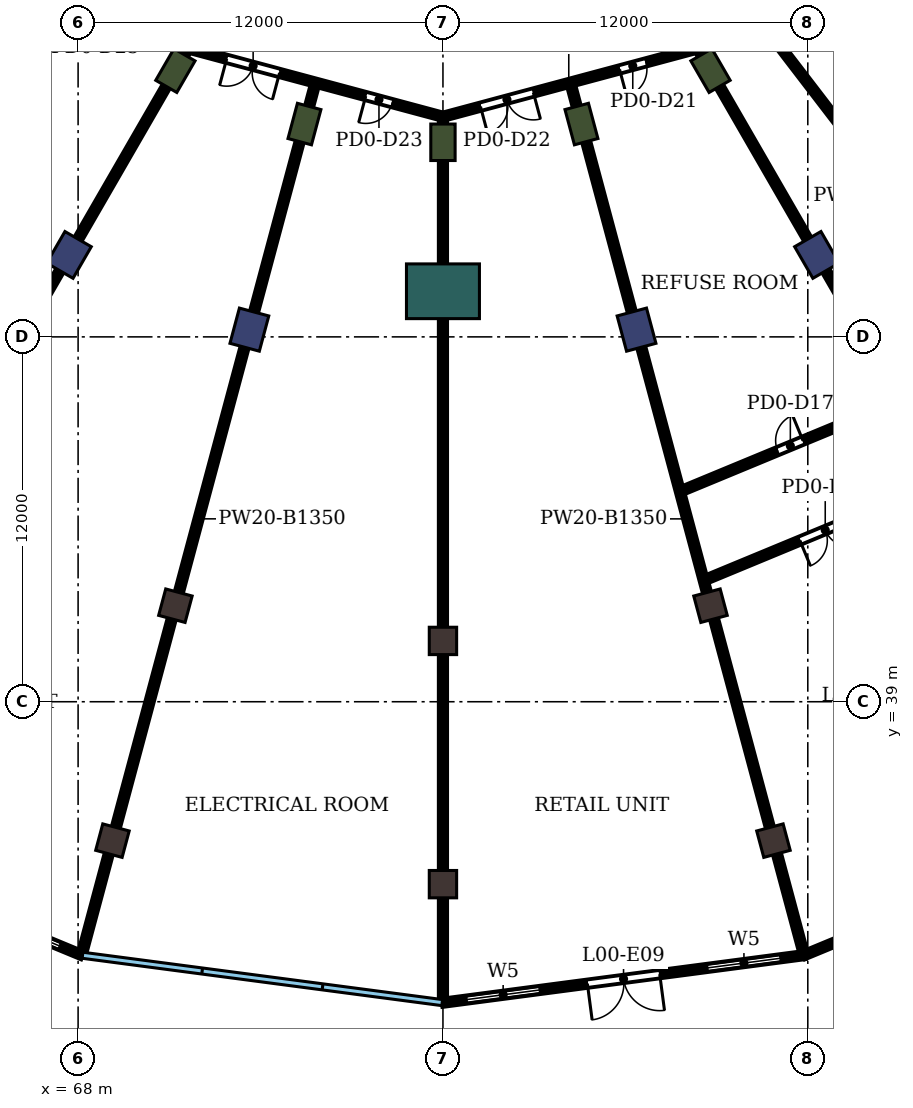
"""IFC4 building model, lengths in metres.
Left out: names, types, materials, properties, quantities, classifications, styles, units other than length and angle.
Written with IfcOpenShell. Run it as: python <this file> out.ifc"""

import sys

from ifc_helpers import new_model, si_unit, direction, frame, frame_2d, origin, origin_2d, place, context, subcontext, project, spatial, rectangle, extrude, element, fill, save


model = new_model("IFC4")
c1 = context("Model", 3, precision=1e-05, world=origin(), true_north=direction((0.0, 1.0)))
c2 = subcontext(c1, "Body", "Model", "MODEL_VIEW")
j1 = project(units=[si_unit("LENGTHUNIT", "METRE"), si_unit("PLANEANGLEUNIT", "RADIAN")], contexts=[c1])
p1 = place(None, origin())
s1 = spatial("IfcSite", under=j1, at=p1, CompositionType="ELEMENT")
p2 = place(p1, origin())
s2 = spatial("IfcBuilding", under=s1, at=p2, CompositionType="ELEMENT")
p3 = place(p2, origin())
s3 = spatial("IfcBuildingStorey", under=s2, at=p3, CompositionType="ELEMENT", Elevation=0.0)
for number, where, z_axis, x_axis in (
    (1, (69.13, 34.431, 0.0), (0.0, 0.0, 1.0), (-0.259, -0.966, 0.0)),
    (2, (80.0, 33.0, 0.0), (0.0, 0.0, 1.0), (0.0, -1.0, 0.0)),
    (3, (90.87, 34.431, 0.0), (0.0, 0.0, 1.0), (0.259, -0.966, 0.0)),
    (4, (71.2, 42.158, 0.0), (0.0, 0.0, 1.0), (-0.259, -0.966, 0.0)),
    (5, (80.0, 41.0, 0.0), (0.0, 0.0, 1.0), (0.0, -1.0, 0.0)),
    (6, (88.8, 42.158, 0.0), (0.0, 0.0, 1.0), (0.259, -0.966, 0.0)),
):
    element("IfcColumn", number, at=place(p3, frame(where, z_axis=z_axis, x_axis=x_axis)), inside=s3, PredefinedType="COLUMN", context=c2, shape_type="SweptSolid", body=[
        extrude(rectangle(XDim=0.9, YDim=0.9, at=origin_2d()), origin(), (0.0, 0.0, 1.0), 7.0),
    ])
for number, where, z_axis, x_axis in (
    (7, (67.7, 53.696, 0.0), (0.0, 0.0, 1.0), (-0.5, -0.866, 0.0)),
    (8, (73.633, 51.238, 0.0), (0.0, 0.0, 1.0), (-0.259, -0.966, 0.0)),
    (9, (86.367, 51.238, 0.0), (0.0, 0.0, 1.0), (0.259, -0.966, 0.0)),
    (10, (92.3, 53.696, 0.0), (0.0, 0.0, 1.0), (0.5, -0.866, 0.0)),
):
    element("IfcColumn", number, at=place(p3, frame(where, z_axis=z_axis, x_axis=x_axis)), inside=s3, PredefinedType="COLUMN", context=c2, shape_type="SweptSolid", body=[
        extrude(rectangle(XDim=1.2, YDim=1.0, at=origin_2d()), origin(), (0.0, 0.0, 1.0), 7.0),
    ])
for number, where, z_axis, x_axis in (
    (11, (71.2, 59.758, 0.0), (0.0, 0.0, 1.0), (-0.5, -0.866, 0.0)),
    (12, (75.445, 58.0, 0.0), (0.0, 0.0, 1.0), (-0.259, -0.966, 0.0)),
    (13, (80.0, 57.4, 0.0), (0.0, 0.0, 1.0), (0.0, -1.0, 0.0)),
    (14, (84.555, 58.0, 0.0), (0.0, 0.0, 1.0), (0.259, -0.966, 0.0)),
    (15, (88.8, 59.758, 0.0), (0.0, 0.0, 1.0), (0.5, -0.866, 0.0)),
):
    element("IfcColumn", number, at=place(p3, frame(where, z_axis=z_axis, x_axis=x_axis)), inside=s3, PredefinedType="COLUMN", context=c2, shape_type="SweptSolid", body=[
        extrude(rectangle(XDim=1.2, YDim=0.8, at=origin_2d()), origin(), (0.0, 0.0, 1.0), 7.0),
    ])
p4 = place(p3, frame((80.0, 52.5, 0.0), z_axis=(0.0, 0.0, 1.0), x_axis=(0.0, -1.0, 0.0)))
e16 = element("IfcColumn", 16, at=p4, inside=s3, PredefinedType="COLUMN", context=c2, shape_type="SweptSolid", body=[
    extrude(rectangle(XDim=1.8, YDim=2.4, at=origin_2d()), origin(), (0.0, 0.0, 1.0), 7.0),
])
p5 = place(p3, frame((57.051, 35.25, 0.0), z_axis=(0.0, 0.0, 1.0), x_axis=(0.923874283273, -0.382696104901, 0.0)))
e17 = element("IfcWall", 17, at=p5, inside=s3, PredefinedType="NOTDEFINED", context=c2, shape_type="SweptSolid", body=[
    extrude(rectangle(XDim=11.982, YDim=0.2, at=frame_2d((5.991, 0.0))), origin(), (0.0, 0.0, 1.0), 7.0),
])
p6 = place(p5, frame((0.797, 0.0, 0.9)))
e18 = element("IfcOpeningElement", 18, at=p6, cuts=e17, PredefinedType="OPENING", context=c2, shape_type="SweptSolid", body=[
    extrude(rectangle(XDim=2.4, YDim=3.6, at=frame_2d((1.2, 1.8))), frame((0.0, 0.11, 0.0), z_axis=(0.0, -1.0, 0.0), x_axis=(1.0, 0.0, 0.0)), (0.0, 0.0, 1.0), 0.22),
])
p7 = place(p5, frame((4.791, 0.0, 0.0)))
e19 = element("IfcOpeningElement", 19, at=p7, cuts=e17, PredefinedType="OPENING", context=c2, shape_type="SweptSolid", body=[
    extrude(rectangle(XDim=2.4, YDim=2.7, at=frame_2d((1.2, 1.35))), frame((0.0, 0.11, 0.0), z_axis=(0.0, -1.0, 0.0), x_axis=(1.0, 0.0, 0.0)), (0.0, 0.0, 1.0), 0.22),
])
p8 = place(p5, frame((8.785, 0.0, 0.9)))
e20 = element("IfcOpeningElement", 20, at=p8, cuts=e17, PredefinedType="OPENING", context=c2, shape_type="SweptSolid", body=[
    extrude(rectangle(XDim=2.4, YDim=3.6, at=frame_2d((1.2, 1.8))), frame((0.0, 0.11, 0.0), z_axis=(0.0, -1.0, 0.0), x_axis=(1.0, 0.0, 0.0)), (0.0, 0.0, 1.0), 0.22),
])
p9 = place(p3, frame((80.0, 29.101, 0.0), z_axis=(0.0, 0.0, 1.0), x_axis=(0.991445069361, 0.130524612391, 0.0)))
e21 = element("IfcWall", 21, at=p9, inside=s3, PredefinedType="NOTDEFINED", context=c2, shape_type="SweptSolid", body=[
    extrude(rectangle(XDim=11.982, YDim=0.2, at=frame_2d((5.991, 0.0))), origin(), (0.0, 0.0, 1.0), 7.0),
])
p10 = place(p9, frame((0.797, 0.0, 0.9)))
e22 = element("IfcOpeningElement", 22, at=p10, cuts=e21, PredefinedType="OPENING", context=c2, shape_type="SweptSolid", body=[
    extrude(rectangle(XDim=2.4, YDim=3.6, at=frame_2d((1.2, 1.8))), frame((0.0, 0.11, 0.0), z_axis=(0.0, -1.0, 0.0), x_axis=(1.0, 0.0, 0.0)), (0.0, 0.0, 1.0), 0.22),
])
p11 = place(p9, frame((4.791, 0.0, 0.0)))
e23 = element("IfcOpeningElement", 23, at=p11, cuts=e21, PredefinedType="OPENING", context=c2, shape_type="SweptSolid", body=[
    extrude(rectangle(XDim=2.4, YDim=2.7, at=frame_2d((1.2, 1.35))), frame((0.0, 0.11, 0.0), z_axis=(0.0, -1.0, 0.0), x_axis=(1.0, 0.0, 0.0)), (0.0, 0.0, 1.0), 0.22),
])
p12 = place(p9, frame((8.785, 0.0, 0.9)))
e24 = element("IfcOpeningElement", 24, at=p12, cuts=e21, PredefinedType="OPENING", context=c2, shape_type="SweptSolid", body=[
    extrude(rectangle(XDim=2.4, YDim=3.6, at=frame_2d((1.2, 1.8))), frame((0.0, 0.11, 0.0), z_axis=(0.0, -1.0, 0.0), x_axis=(1.0, 0.0, 0.0)), (0.0, 0.0, 1.0), 0.22),
])
p13 = place(p3, frame((91.88, 30.665, 0.0), z_axis=(0.0, 0.0, 1.0), x_axis=(0.923874283273, 0.382696104901, 0.0)))
e25 = element("IfcWall", 25, at=p13, inside=s3, PredefinedType="NOTDEFINED", context=c2, shape_type="SweptSolid", body=[
    extrude(rectangle(XDim=11.982, YDim=0.2, at=frame_2d((5.991, 0.0))), origin(), (0.0, 0.0, 1.0), 7.0),
])
p14 = place(p13, frame((3.891, 0.0, 0.0)))
e26 = element("IfcOpeningElement", 26, at=p14, cuts=e25, PredefinedType="OPENING", context=c2, shape_type="SweptSolid", body=[
    extrude(rectangle(XDim=4.2, YDim=4.5, at=frame_2d((2.1, 2.25))), frame((0.0, 0.11, 0.0), z_axis=(0.0, -1.0, 0.0), x_axis=(1.0, 0.0, 0.0)), (0.0, 0.0, 1.0), 0.22),
])
p15 = place(p3, frame((47.615, 42.615, 0.0), z_axis=(0.0, 0.0, 1.0), x_axis=(0.707106781187, 0.707106781187, 0.0)))
e27 = element("IfcWall", 27, at=p15, inside=s3, PredefinedType="PARTITIONING", context=c2, shape_type="SweptSolid", body=[
    extrude(rectangle(XDim=29.203, YDim=0.2, at=frame_2d((14.602, 0.0))), origin(), (0.0, 0.0, 1.0), 5.65),
])
p16 = place(p3, frame((57.099, 35.339, 0.0), z_axis=(0.0, 0.0, 1.0), x_axis=(0.500039914135, 0.866002358122, 0.0)))
e28 = element("IfcWall", 28, at=p16, inside=s3, PredefinedType="PARTITIONING", context=c2, shape_type="SweptSolid", body=[
    extrude(rectangle(XDim=28.958, YDim=0.2, at=frame_2d((14.479, 0.0))), origin(), (0.0, 0.0, 1.0), 5.65),
])
p17 = place(p3, frame((68.142, 30.764, 0.0), z_axis=(0.0, 0.0, 1.0), x_axis=(0.258909634149, 0.965901548474, 0.0)))
e29 = element("IfcWall", 29, at=p17, inside=s3, PredefinedType="PARTITIONING", context=c2, shape_type="SweptSolid", body=[
    extrude(rectangle(XDim=29.509, YDim=0.2, at=frame_2d((14.754, 0.0))), origin(), (0.0, 0.0, 1.0), 5.65),
])
p18 = place(p3, frame((71.685, 60.468, 0.0), z_axis=(0.0, 0.0, 1.0), x_axis=(0.96590736437, -0.258887936097, 0.0)))
e30 = element("IfcWall", 30, at=p18, inside=s3, PredefinedType="PARTITIONING", context=c2, shape_type="SweptSolid", body=[
    extrude(rectangle(XDim=8.519, YDim=0.2, at=frame_2d((4.259, 0.0))), origin(), (0.0, 0.0, 1.0), 6.55),
])
p19 = place(p18, frame((5.979, 0.0, 0.0)))
e31 = element("IfcOpeningElement", 31, at=p19, cuts=e30, PredefinedType="OPENING", context=c2, shape_type="SweptSolid", body=[
    extrude(rectangle(XDim=0.9, YDim=2.1, at=frame_2d((0.45, 1.05))), frame((0.0, 0.11, 0.0), z_axis=(0.0, -1.0, 0.0), x_axis=(1.0, 0.0, 0.0)), (0.0, 0.0, 1.0), 0.22),
])
p20 = place(p18, frame((1.245, 0.0, 0.0)))
e32 = element("IfcOpeningElement", 32, at=p20, cuts=e30, PredefinedType="OPENING", context=c2, shape_type="SweptSolid", body=[
    extrude(rectangle(XDim=1.8, YDim=2.1, at=frame_2d((0.9, 1.05))), frame((0.0, 0.11, 0.0), z_axis=(0.0, -1.0, 0.0), x_axis=(1.0, 0.0, 0.0)), (0.0, 0.0, 1.0), 0.22),
])
p21 = place(p3, frame((80.0, 29.202, 0.0), z_axis=(0.0, 0.0, 1.0), x_axis=(0.0, 1.0, 0.0)))
e33 = element("IfcWall", 33, at=p21, inside=s3, PredefinedType="PARTITIONING", context=c2, shape_type="SweptSolid", body=[
    extrude(rectangle(XDim=28.948, YDim=0.2, at=frame_2d((14.474, 0.0))), origin(), (0.0, 0.0, 1.0), 5.65),
])
p22 = place(p3, frame((80.0, 58.24, 0.0), z_axis=(0.0, 0.0, 1.0), x_axis=(0.965929228495, 0.258806347564, 0.0)))
e34 = element("IfcWall", 34, at=p22, inside=s3, PredefinedType="PARTITIONING", context=c2, shape_type="SweptSolid", body=[
    extrude(rectangle(XDim=8.568, YDim=0.2, at=frame_2d((4.284, 0.0))), origin(), (0.0, 0.0, 1.0), 6.55),
])
p23 = place(p22, frame((6.013, 0.0, 0.0)))
e35 = element("IfcOpeningElement", 35, at=p23, cuts=e34, PredefinedType="OPENING", context=c2, shape_type="SweptSolid", body=[
    extrude(rectangle(XDim=0.9, YDim=2.1, at=frame_2d((0.45, 1.05))), frame((0.0, 0.11, 0.0), z_axis=(0.0, -1.0, 0.0), x_axis=(1.0, 0.0, 0.0)), (0.0, 0.0, 1.0), 0.22),
])
p24 = place(p22, frame((1.279, 0.0, 0.0)))
e36 = element("IfcOpeningElement", 36, at=p24, cuts=e34, PredefinedType="OPENING", context=c2, shape_type="SweptSolid", body=[
    extrude(rectangle(XDim=1.8, YDim=2.1, at=frame_2d((0.9, 1.05))), frame((0.0, 0.11, 0.0), z_axis=(0.0, -1.0, 0.0), x_axis=(1.0, 0.0, 0.0)), (0.0, 0.0, 1.0), 0.22),
])
p25 = place(p3, frame((84.216, 59.265, 0.0), z_axis=(0.0, 0.0, 1.0), x_axis=(0.258760898943, -0.96594140463, 0.0)))
e37 = element("IfcWall", 37, at=p25, inside=s3, PredefinedType="PARTITIONING", context=c2, shape_type="SweptSolid", body=[
    extrude(rectangle(XDim=29.508, YDim=0.2, at=frame_2d((14.754, 0.0))), origin(), (0.0, 0.0, 1.0), 5.65),
])
p26 = place(p3, frame((87.896, 45.954, 0.0), z_axis=(0.0, 0.0, 1.0), x_axis=(0.923937266852, 0.382544019587, 0.0)))
e38 = element("IfcWall", 38, at=p26, inside=s3, PredefinedType="PARTITIONING", context=c2, shape_type="SweptSolid", body=[
    extrude(rectangle(XDim=7.628, YDim=0.2, at=frame_2d((3.814, 0.0))), origin(), (0.0, 0.0, 1.0), 6.55),
])
p27 = place(p26, frame((3.371, 0.0, 0.0)))
e39 = element("IfcOpeningElement", 39, at=p27, cuts=e38, PredefinedType="OPENING", context=c2, shape_type="SweptSolid", body=[
    extrude(rectangle(XDim=0.9, YDim=2.1, at=frame_2d((0.45, 1.05))), frame((0.0, 0.11, 0.0), z_axis=(0.0, -1.0, 0.0), x_axis=(1.0, 0.0, 0.0)), (0.0, 0.0, 1.0), 0.22),
])
p28 = place(p3, frame((88.362, 60.509, 0.0), z_axis=(0.0, 0.0, 1.0), x_axis=(0.499842399886, -0.866116375134, 0.0)))
e40 = element("IfcWall", 40, at=p28, inside=s3, PredefinedType="PARTITIONING", context=c2, shape_type="SweptSolid", body=[
    extrude(rectangle(XDim=13.274, YDim=0.2, at=frame_2d((6.637, 0.0))), origin(), (0.0, 0.0, 1.0), 5.65),
])
p29 = place(p3, frame((88.679, 43.031, 0.0), z_axis=(0.0, 0.0, 1.0), x_axis=(0.923882727898, 0.382675717927, 0.0)))
e41 = element("IfcWall", 41, at=p29, inside=s3, PredefinedType="PARTITIONING", context=c2, shape_type="SweptSolid", body=[
    extrude(rectangle(XDim=8.432, YDim=0.2, at=frame_2d((4.216, 0.0))), origin(), (0.0, 0.0, 1.0), 6.55),
])
p30 = place(p29, frame((3.316, 0.0, 0.0)))
e42 = element("IfcOpeningElement", 42, at=p30, cuts=e41, PredefinedType="OPENING", context=c2, shape_type="SweptSolid", body=[
    extrude(rectangle(XDim=1.8, YDim=2.1, at=frame_2d((0.9, 1.05))), frame((0.0, 0.11, 0.0), z_axis=(0.0, -1.0, 0.0), x_axis=(1.0, 0.0, 0.0)), (0.0, 0.0, 1.0), 0.22),
])
p31 = place(p3, frame((90.088, 61.849, 0.0), z_axis=(0.0, 0.0, 1.0), x_axis=(0.608726617775, -0.793380050677, 0.0)))
e43 = element("IfcWall", 43, at=p31, inside=s3, PredefinedType="PARTITIONING", context=c2, shape_type="SweptSolid", body=[
    extrude(rectangle(XDim=13.182, YDim=0.2, at=frame_2d((6.591, 0.0))), origin(), (0.0, 0.0, 1.0), 6.55),
])
p32 = place(p3, frame((91.732, 63.263, 0.0), z_axis=(0.0, 0.0, 1.0), x_axis=(0.706939557171, -0.707273965665, 0.0)))
e44 = element("IfcWall", 44, at=p32, inside=s3, PredefinedType="PARTITIONING", context=c2, shape_type="SweptSolid", body=[
    extrude(rectangle(XDim=29.203, YDim=0.2, at=frame_2d((14.601, 0.0))), origin(), (0.0, 0.0, 1.0), 5.65),
])
p33 = place(p8, origin())
e45 = element("IfcWindow", 45, at=p33, inside=s3, PartitioningType="SINGLE_PANEL", PredefinedType="WINDOW", context=c2, shape_type="SweptSolid", body=[
    extrude(rectangle(XDim=2.4, YDim=3.6, at=frame_2d((1.2, 1.8))), frame((0.0, 0.03, 0.0), z_axis=(0.0, -1.0, 0.0), x_axis=(1.0, 0.0, 0.0)), (0.0, 0.0, 1.0), 0.06),
])
fill(e20, e45)
p34 = place(p10, origin())
e46 = element("IfcWindow", 46, at=p34, inside=s3, PartitioningType="SINGLE_PANEL", PredefinedType="WINDOW", context=c2, shape_type="SweptSolid", body=[
    extrude(rectangle(XDim=2.4, YDim=3.6, at=frame_2d((1.2, 1.8))), frame((0.0, 0.03, 0.0), z_axis=(0.0, -1.0, 0.0), x_axis=(1.0, 0.0, 0.0)), (0.0, 0.0, 1.0), 0.06),
])
fill(e22, e46)
p35 = place(p11, frame((2.4, 0.0, 0.0), z_axis=(0.0, 0.0, 1.0), x_axis=(-1.0, 0.0, 0.0)))
e47 = element("IfcDoor", 47, at=p35, inside=s3, OperationType="DOUBLE_DOOR_SINGLE_SWING", PredefinedType="DOOR", context=c2, shape_type="SweptSolid", body=[
    extrude(rectangle(XDim=2.4, YDim=2.7, at=frame_2d((1.2, 1.35))), frame((0.0, 0.025, 0.0), z_axis=(0.0, -1.0, 0.0), x_axis=(1.0, 0.0, 0.0)), (0.0, 0.0, 1.0), 0.05),
])
fill(e23, e47)
p36 = place(p12, origin())
e48 = element("IfcWindow", 48, at=p36, inside=s3, PartitioningType="SINGLE_PANEL", PredefinedType="WINDOW", context=c2, shape_type="SweptSolid", body=[
    extrude(rectangle(XDim=2.4, YDim=3.6, at=frame_2d((1.2, 1.8))), frame((0.0, 0.03, 0.0), z_axis=(0.0, -1.0, 0.0), x_axis=(1.0, 0.0, 0.0)), (0.0, 0.0, 1.0), 0.06),
])
fill(e24, e48)
p37 = place(p30, frame((1.8, 0.0, 0.0), z_axis=(0.0, 0.0, 1.0), x_axis=(-1.0, 0.0, 0.0)))
e49 = element("IfcDoor", 49, at=p37, inside=s3, OperationType="DOUBLE_DOOR_SINGLE_SWING", PredefinedType="DOOR", context=c2, shape_type="SweptSolid", body=[
    extrude(rectangle(XDim=1.8, YDim=2.1, at=frame_2d((0.9, 1.05))), frame((0.0, 0.025, 0.0), z_axis=(0.0, -1.0, 0.0), x_axis=(1.0, 0.0, 0.0)), (0.0, 0.0, 1.0), 0.05),
])
fill(e42, e49)
p38 = place(p27, origin())
e50 = element("IfcDoor", 50, at=p38, inside=s3, OperationType="SINGLE_SWING_RIGHT", PredefinedType="DOOR", context=c2, shape_type="SweptSolid", body=[
    extrude(rectangle(XDim=0.9, YDim=2.1, at=frame_2d((0.45, 1.05))), frame((0.0, 0.025, 0.0), z_axis=(0.0, -1.0, 0.0), x_axis=(1.0, 0.0, 0.0)), (0.0, 0.0, 1.0), 0.05),
])
fill(e39, e50)
p39 = place(p23, frame((0.9, 0.0, 0.0), z_axis=(0.0, 0.0, 1.0), x_axis=(-1.0, 0.0, 0.0)))
e51 = element("IfcDoor", 51, at=p39, inside=s3, OperationType="SINGLE_SWING_RIGHT", PredefinedType="DOOR", context=c2, shape_type="SweptSolid", body=[
    extrude(rectangle(XDim=0.9, YDim=2.1, at=frame_2d((0.45, 1.05))), frame((0.0, 0.025, 0.0), z_axis=(0.0, -1.0, 0.0), x_axis=(1.0, 0.0, 0.0)), (0.0, 0.0, 1.0), 0.05),
])
fill(e35, e51)
p40 = place(p24, frame((1.8, 0.0, 0.0), z_axis=(0.0, 0.0, 1.0), x_axis=(-1.0, 0.0, 0.0)))
e52 = element("IfcDoor", 52, at=p40, inside=s3, OperationType="DOUBLE_DOOR_SINGLE_SWING", PredefinedType="DOOR", context=c2, shape_type="SweptSolid", body=[
    extrude(rectangle(XDim=1.8, YDim=2.1, at=frame_2d((0.9, 1.05))), frame((0.0, 0.025, 0.0), z_axis=(0.0, -1.0, 0.0), x_axis=(1.0, 0.0, 0.0)), (0.0, 0.0, 1.0), 0.05),
])
fill(e36, e52)
p41 = place(p19, frame((0.9, 0.0, 0.0), z_axis=(0.0, 0.0, 1.0), x_axis=(-1.0, 0.0, 0.0)))
e53 = element("IfcDoor", 53, at=p41, inside=s3, OperationType="SINGLE_SWING_RIGHT", PredefinedType="DOOR", context=c2, shape_type="SweptSolid", body=[
    extrude(rectangle(XDim=0.9, YDim=2.1, at=frame_2d((0.45, 1.05))), frame((0.0, 0.025, 0.0), z_axis=(0.0, -1.0, 0.0), x_axis=(1.0, 0.0, 0.0)), (0.0, 0.0, 1.0), 0.05),
])
fill(e31, e53)
p42 = place(p20, frame((1.8, 0.0, 0.0), z_axis=(0.0, 0.0, 1.0), x_axis=(-1.0, 0.0, 0.0)))
e54 = element("IfcDoor", 54, at=p42, inside=s3, OperationType="DOUBLE_DOOR_SINGLE_SWING", PredefinedType="DOOR", context=c2, shape_type="SweptSolid", body=[
    extrude(rectangle(XDim=1.8, YDim=2.1, at=frame_2d((0.9, 1.05))), frame((0.0, 0.025, 0.0), z_axis=(0.0, -1.0, 0.0), x_axis=(1.0, 0.0, 0.0)), (0.0, 0.0, 1.0), 0.05),
])
fill(e32, e54)
save(model, sys.argv[1])
